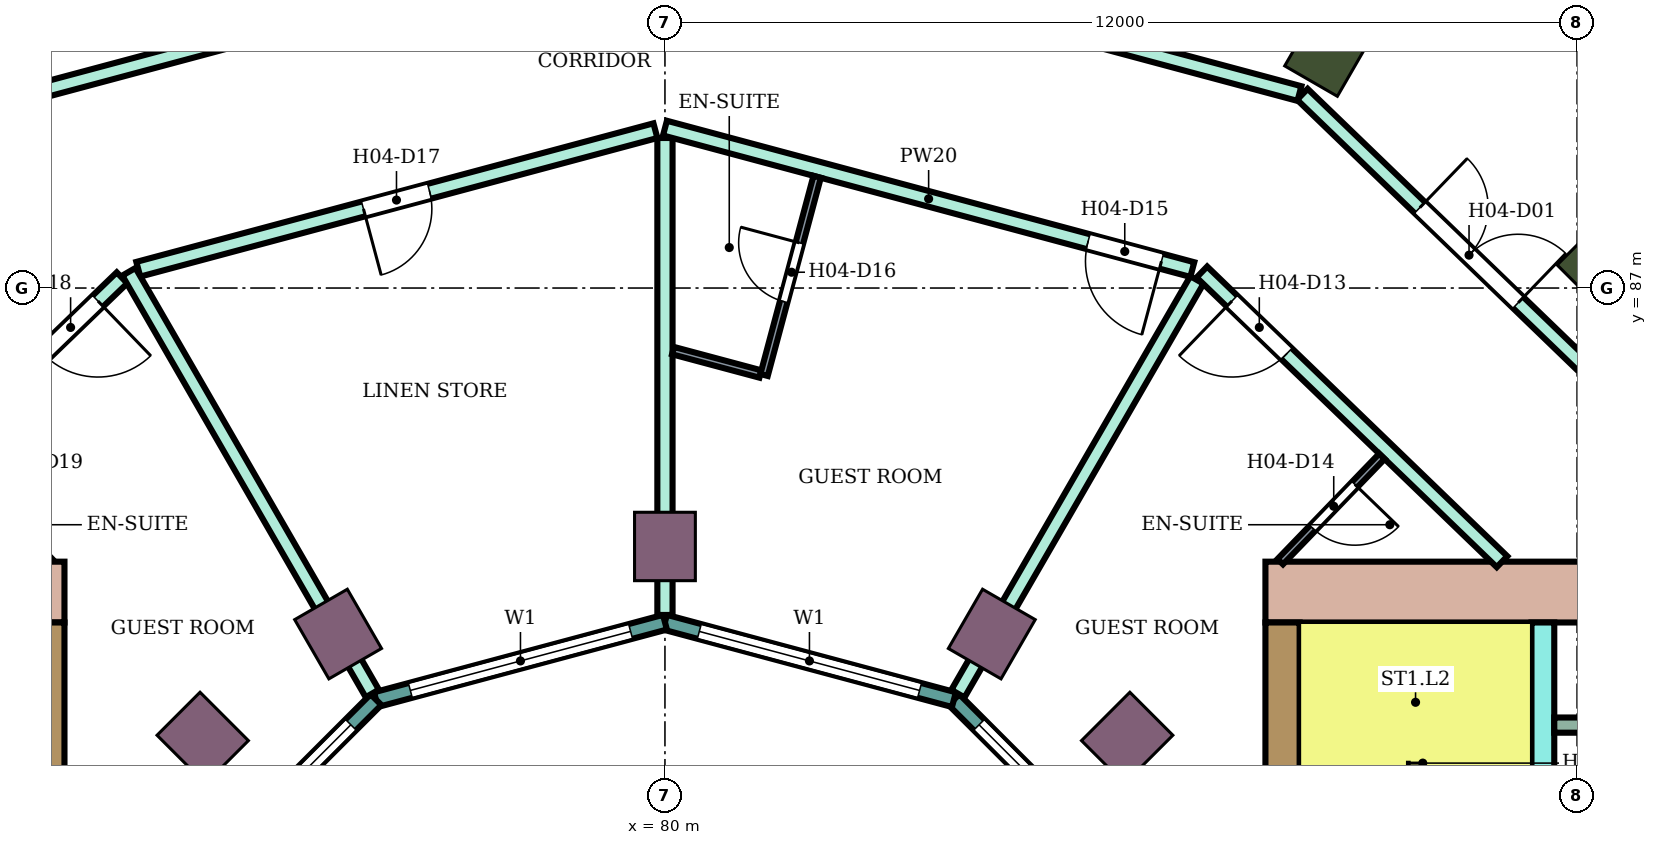
"""IFC4 building model, lengths in metres.
Left out: names, types, materials, properties, quantities, classifications, styles, units other than length and angle.
Written with IfcOpenShell. Run it as: python <this file> out.ifc"""

import sys

from ifc_helpers import new_model, si_unit, direction, frame, frame_2d, origin, origin_2d, place, context, subcontext, project, spatial, rectangle, extrude, element, fill, save


model = new_model("IFC4")
c1 = context("Model", 3, precision=1e-05, world=origin(), true_north=direction((0.0, 1.0)))
c2 = subcontext(c1, "Body", "Model", "MODEL_VIEW")
j1 = project(units=[si_unit("LENGTHUNIT", "METRE"), si_unit("PLANEANGLEUNIT", "RADIAN")], contexts=[c1])
p1 = place(None, origin())
s1 = spatial("IfcSite", under=j1, at=p1, CompositionType="ELEMENT")
p2 = place(p1, origin())
s2 = spatial("IfcBuilding", under=s1, at=p2, CompositionType="ELEMENT")
p3 = place(p2, frame((0.0, 0.0, 70.6)))
s3 = spatial("IfcBuildingStorey", under=s2, at=p3, CompositionType="ELEMENT", Elevation=70.6)
for number, where, z_axis, x_axis in (
    (1, (92.445, 87.445, 0.0), (0.0, 0.0, 1.0), (0.707, 0.707, 0.0)),
    (2, (88.8, 90.242, 0.0), (0.0, 0.0, 1.0), (0.5, 0.866, 0.0)),
):
    element("IfcColumn", number, at=place(p3, frame(where, z_axis=z_axis, x_axis=x_axis)), inside=s3, PredefinedType="COLUMN", context=c2, shape_type="SweptSolid", body=[
        extrude(rectangle(XDim=1.2, YDim=0.8, at=origin_2d()), origin(), (0.0, 0.0, 1.0), 3.8),
    ])
for number, where, z_axis, x_axis in (
    (3, (86.081, 81.081, 0.0), (0.0, 0.0, 1.0), (0.707, 0.707, 0.0)),
    (4, (84.3, 82.448, 0.0), (0.0, 0.0, 1.0), (0.5, 0.866, 0.0)),
    (5, (80.0, 83.6, 0.0), (0.0, 0.0, 1.0), (0.0, 1.0, 0.0)),
    (6, (75.7, 82.448, 0.0), (0.0, 0.0, 1.0), (-0.5, 0.866, 0.0)),
    (7, (73.919, 81.081, 0.0), (0.0, 0.0, 1.0), (-0.707, 0.707, 0.0)),
):
    element("IfcColumn", number, at=place(p3, frame(where, z_axis=z_axis, x_axis=x_axis)), inside=s3, PredefinedType="COLUMN", context=c2, shape_type="SweptSolid", body=[
        extrude(rectangle(XDim=0.9, YDim=0.8, at=origin_2d()), origin(), (0.0, 0.0, 1.0), 3.8),
    ])
p4 = place(p3, frame((87.9, 83.0, 0.0), z_axis=(0.0, 0.0, 1.0), x_axis=(1.0, 0.0, 0.0)))
e8 = element("IfcWall", 8, at=p4, inside=s3, PredefinedType="SHEAR", context=c2, shape_type="SweptSolid", body=[
    extrude(rectangle(XDim=14.7, YDim=0.8, at=frame_2d((7.35, 0.0))), origin(), (0.0, 0.0, 1.0), 3.4),
])
p5 = place(p4, frame((4.2, 0.0, 0.0)))
e9 = element("IfcOpeningElement", 9, at=p5, cuts=e8, PredefinedType="OPENING", context=c2, shape_type="SweptSolid", body=[
    extrude(rectangle(XDim=2.4, YDim=2.4, at=frame_2d((1.2, 1.2))), frame((0.0, 0.41, 0.0), z_axis=(0.0, -1.0, 0.0), x_axis=(1.0, 0.0, 0.0)), (0.0, 0.0, 1.0), 0.82),
])
p6 = place(p3, frame((88.125, 75.0, 0.0), z_axis=(0.0, 0.0, 1.0), x_axis=(0.0, 1.0, 0.0)))
e10 = element("IfcWall", 10, at=p6, inside=s3, PredefinedType="SHEAR", context=c2, shape_type="SweptSolid", body=[
    extrude(rectangle(XDim=7.6, YDim=0.45, at=frame_2d((3.8, 0.0))), origin(), (0.0, 0.0, 1.0), 3.4),
])
p7 = place(p3, frame((91.55, 75.0, 0.0), z_axis=(0.0, 0.0, 1.0), x_axis=(0.0, 1.0, 0.0)))
e11 = element("IfcWall", 11, at=p7, inside=s3, PredefinedType="SHEAR", context=c2, shape_type="SweptSolid", body=[
    extrude(rectangle(XDim=7.6, YDim=0.3, at=frame_2d((3.8, 0.0))), origin(), (0.0, 0.0, 1.0), 3.4),
])
p8 = place(p7, frame((1.85, 0.0, 0.0)))
e12 = element("IfcOpeningElement", 12, at=p8, cuts=e11, PredefinedType="OPENING", context=c2, shape_type="SweptSolid", body=[
    extrude(rectangle(XDim=0.9, YDim=2.1, at=frame_2d((0.45, 1.05))), frame((0.0, 0.16, 0.0), z_axis=(0.0, -1.0, 0.0), x_axis=(1.0, 0.0, 0.0)), (0.0, 0.0, 1.0), 0.32),
])
p9 = place(p3, frame((91.7, 81.25, 0.0), z_axis=(0.0, 0.0, 1.0), x_axis=(1.0, 0.0, 0.0)))
e13 = element("IfcWall", 13, at=p9, inside=s3, PredefinedType="SHEAR", context=c2, shape_type="SweptSolid", body=[
    extrude(rectangle(XDim=4.65, YDim=0.2, at=frame_2d((2.325, 0.0))), origin(), (0.0, 0.0, 1.0), 3.4),
])
p10 = place(p3, frame((72.1, 83.0, 0.0), z_axis=(0.0, 0.0, 1.0), x_axis=(-1.0, 0.0, 0.0)))
e14 = element("IfcWall", 14, at=p10, inside=s3, PredefinedType="SHEAR", context=c2, shape_type="SweptSolid", body=[
    extrude(rectangle(XDim=14.7, YDim=0.8, at=frame_2d((7.35, 0.0))), origin(), (0.0, 0.0, 1.0), 3.4),
])
p11 = place(p10, frame((4.2, 0.0, 0.0)))
e15 = element("IfcOpeningElement", 15, at=p11, cuts=e14, PredefinedType="OPENING", context=c2, shape_type="SweptSolid", body=[
    extrude(rectangle(XDim=2.4, YDim=2.4, at=frame_2d((1.2, 1.2))), frame((0.0, 0.41, 0.0), z_axis=(0.0, -1.0, 0.0), x_axis=(1.0, 0.0, 0.0)), (0.0, 0.0, 1.0), 0.82),
])
p12 = place(p3, frame((71.875, 82.6, 0.0), z_axis=(0.0, 0.0, 1.0), x_axis=(0.0, -1.0, 0.0)))
e16 = element("IfcWall", 16, at=p12, inside=s3, PredefinedType="SHEAR", context=c2, shape_type="SweptSolid", body=[
    extrude(rectangle(XDim=7.6, YDim=0.45, at=frame_2d((3.8, 0.0))), origin(), (0.0, 0.0, 1.0), 3.4),
])
p13 = place(p3, frame((86.585, 78.802, 0.0), z_axis=(0.0, 0.0, 1.0), x_axis=(-0.707106781187, 0.707106781187, 0.0)))
e17 = element("IfcWall", 17, at=p13, inside=s3, PredefinedType="NOTDEFINED", context=c2, shape_type="SweptSolid", body=[
    extrude(rectangle(XDim=3.936, YDim=0.2, at=frame_2d((1.968, 0.0))), origin(), (0.0, 0.0, 1.0), 3.8),
])
p14 = place(p13, frame((0.468, 0.0, 0.9)))
e18 = element("IfcOpeningElement", 18, at=p14, cuts=e17, PredefinedType="OPENING", context=c2, shape_type="SweptSolid", body=[
    extrude(rectangle(XDim=3.0, YDim=2.3, at=frame_2d((1.5, 1.15))), frame((0.0, 0.11, 0.0), z_axis=(0.0, -1.0, 0.0), x_axis=(1.0, 0.0, 0.0)), (0.0, 0.0, 1.0), 0.22),
])
p15 = place(p3, frame((83.802, 81.585, 0.0), z_axis=(0.0, 0.0, 1.0), x_axis=(-0.965933654434, 0.258789828301, 0.0)))
e19 = element("IfcWall", 19, at=p15, inside=s3, PredefinedType="NOTDEFINED", context=c2, shape_type="SweptSolid", body=[
    extrude(rectangle(XDim=3.936, YDim=0.2, at=frame_2d((1.968, 0.0))), origin(), (0.0, 0.0, 1.0), 3.8),
])
p16 = place(p15, frame((0.468, 0.0, 0.9)))
e20 = element("IfcOpeningElement", 20, at=p16, cuts=e19, PredefinedType="OPENING", context=c2, shape_type="SweptSolid", body=[
    extrude(rectangle(XDim=3.0, YDim=2.3, at=frame_2d((1.5, 1.15))), frame((0.0, 0.11, 0.0), z_axis=(0.0, -1.0, 0.0), x_axis=(1.0, 0.0, 0.0)), (0.0, 0.0, 1.0), 0.22),
])
p17 = place(p3, frame((80.0, 82.604, 0.0), z_axis=(0.0, 0.0, 1.0), x_axis=(-0.965933654434, -0.258789828301, 0.0)))
e21 = element("IfcWall", 21, at=p17, inside=s3, PredefinedType="NOTDEFINED", context=c2, shape_type="SweptSolid", body=[
    extrude(rectangle(XDim=3.936, YDim=0.2, at=frame_2d((1.968, 0.0))), origin(), (0.0, 0.0, 1.0), 3.8),
])
p18 = place(p17, frame((0.468, 0.0, 0.9)))
e22 = element("IfcOpeningElement", 22, at=p18, cuts=e21, PredefinedType="OPENING", context=c2, shape_type="SweptSolid", body=[
    extrude(rectangle(XDim=3.0, YDim=2.3, at=frame_2d((1.5, 1.15))), frame((0.0, 0.11, 0.0), z_axis=(0.0, -1.0, 0.0), x_axis=(1.0, 0.0, 0.0)), (0.0, 0.0, 1.0), 0.22),
])
p19 = place(p3, frame((76.198, 81.585, 0.0), z_axis=(0.0, 0.0, 1.0), x_axis=(-0.707106781187, -0.707106781187, 0.0)))
e23 = element("IfcWall", 23, at=p19, inside=s3, PredefinedType="NOTDEFINED", context=c2, shape_type="SweptSolid", body=[
    extrude(rectangle(XDim=3.936, YDim=0.2, at=frame_2d((1.968, 0.0))), origin(), (0.0, 0.0, 1.0), 3.8),
])
p20 = place(p19, frame((0.468, 0.0, 0.9)))
e24 = element("IfcOpeningElement", 24, at=p20, cuts=e23, PredefinedType="OPENING", context=c2, shape_type="SweptSolid", body=[
    extrude(rectangle(XDim=3.0, YDim=2.3, at=frame_2d((1.5, 1.15))), frame((0.0, 0.11, 0.0), z_axis=(0.0, -1.0, 0.0), x_axis=(1.0, 0.0, 0.0)), (0.0, 0.0, 1.0), 0.22),
])
p21 = place(p3, frame((68.987, 83.4, 0.0), z_axis=(0.0, 0.0, 1.0), x_axis=(0.719591503389, 0.694397629784, 0.0)))
e25 = element("IfcWall", 25, at=p21, inside=s3, PredefinedType="PARTITIONING", context=c2, shape_type="SweptSolid", body=[
    extrude(rectangle(XDim=5.378, YDim=0.2, at=frame_2d((2.689, 0.0))), origin(), (0.0, 0.0, 1.0), 3.35),
])
p22 = place(p21, frame((3.938, 0.0, 0.0)))
e26 = element("IfcOpeningElement", 26, at=p22, cuts=e25, PredefinedType="OPENING", context=c2, shape_type="SweptSolid", body=[
    extrude(rectangle(XDim=1.0, YDim=2.1, at=frame_2d((0.5, 1.05))), frame((0.0, 0.11, 0.0), z_axis=(0.0, -1.0, 0.0), x_axis=(1.0, 0.0, 0.0)), (0.0, 0.0, 1.0), 0.22),
])
p23 = place(p3, frame((71.614, 89.55, 0.0), z_axis=(0.0, 0.0, 1.0), x_axis=(0.965982156828, 0.258608725086, 0.0)))
e27 = element("IfcWall", 27, at=p23, inside=s3, PredefinedType="PARTITIONING", context=c2, shape_type="SweptSolid", body=[
    extrude(rectangle(XDim=8.592, YDim=0.2, at=frame_2d((4.296, 0.0))), origin(), (0.0, 0.0, 1.0), 3.35),
])
p24 = place(p23, frame((4.865, 0.0, 0.0)))
e28 = element("IfcOpeningElement", 28, at=p24, cuts=e27, PredefinedType="OPENING", context=c2, shape_type="SweptSolid", body=[
    extrude(rectangle(XDim=1.0, YDim=2.1, at=frame_2d((0.5, 1.05))), frame((0.0, 0.11, 0.0), z_axis=(0.0, -1.0, 0.0), x_axis=(1.0, 0.0, 0.0)), (0.0, 0.0, 1.0), 0.22),
])
p25 = place(p23, frame((2.804, 0.0, 0.0)))
e29 = element("IfcOpeningElement", 29, at=p25, cuts=e27, PredefinedType="OPENING", context=c2, shape_type="SweptSolid", body=[
    extrude(rectangle(XDim=1.0, YDim=2.1, at=frame_2d((0.5, 1.05))), frame((0.0, 0.11, 0.0), z_axis=(0.0, -1.0, 0.0), x_axis=(1.0, 0.0, 0.0)), (0.0, 0.0, 1.0), 0.22),
])
p26 = place(p3, frame((73.071, 87.247, 0.0), z_axis=(0.0, 0.0, 1.0), x_axis=(0.965914318977, 0.258861987157, 0.0)))
e30 = element("IfcWall", 30, at=p26, inside=s3, PredefinedType="PARTITIONING", context=c2, shape_type="SweptSolid", body=[
    extrude(rectangle(XDim=7.043, YDim=0.2, at=frame_2d((3.521, 0.0))), origin(), (0.0, 0.0, 1.0), 3.35),
])
p27 = place(p26, frame((3.067, 0.0, 0.0)))
e31 = element("IfcOpeningElement", 31, at=p27, cuts=e30, PredefinedType="OPENING", context=c2, shape_type="SweptSolid", body=[
    extrude(rectangle(XDim=0.9, YDim=2.1, at=frame_2d((0.45, 1.05))), frame((0.0, 0.11, 0.0), z_axis=(0.0, -1.0, 0.0), x_axis=(1.0, 0.0, 0.0)), (0.0, 0.0, 1.0), 0.22),
])
p28 = place(p3, frame((72.948, 87.214, 0.0), z_axis=(0.0, 0.0, 1.0), x_axis=(0.499927021214, -0.866067534006, 0.0)))
e32 = element("IfcWall", 32, at=p28, inside=s3, PredefinedType="PARTITIONING", context=c2, shape_type="SweptSolid", body=[
    extrude(rectangle(XDim=6.405, YDim=0.2, at=frame_2d((3.203, 0.0))), origin(), (0.0, 0.0, 1.0), 3.35),
])
p29 = place(p3, frame((80.0, 82.699, 0.0), z_axis=(0.0, 0.0, 1.0), x_axis=(0.0, 1.0, 0.0)))
e33 = element("IfcWall", 33, at=p29, inside=s3, PredefinedType="PARTITIONING", context=c2, shape_type="SweptSolid", body=[
    extrude(rectangle(XDim=6.275, YDim=0.2, at=frame_2d((3.138, 0.0))), origin(), (0.0, 0.0, 1.0), 3.35),
])
p30 = place(p3, frame((80.0, 89.104, 0.0), z_axis=(0.0, 0.0, 1.0), x_axis=(0.965854247166, -0.25908603442, 0.0)))
e34 = element("IfcWall", 34, at=p30, inside=s3, PredefinedType="PARTITIONING", context=c2, shape_type="SweptSolid", body=[
    extrude(rectangle(XDim=7.183, YDim=0.2, at=frame_2d((3.592, 0.0))), origin(), (0.0, 0.0, 1.0), 3.35),
])
p31 = place(p30, frame((5.763, 0.0, 0.0)))
e35 = element("IfcOpeningElement", 35, at=p31, cuts=e34, PredefinedType="OPENING", context=c2, shape_type="SweptSolid", body=[
    extrude(rectangle(XDim=1.0, YDim=2.1, at=frame_2d((0.5, 1.05))), frame((0.0, 0.11, 0.0), z_axis=(0.0, -1.0, 0.0), x_axis=(1.0, 0.0, 0.0)), (0.0, 0.0, 1.0), 0.22),
])
p32 = place(p3, frame((80.0, 91.796, 0.0), z_axis=(0.0, 0.0, 1.0), x_axis=(0.965891796243, -0.258946013582, 0.0)))
e36 = element("IfcWall", 36, at=p32, inside=s3, PredefinedType="PARTITIONING", context=c2, shape_type="SweptSolid", body=[
    extrude(rectangle(XDim=8.642, YDim=0.2, at=frame_2d((4.321, 0.0))), origin(), (0.0, 0.0, 1.0), 3.35),
])
p33 = place(p32, frame((2.817, 0.0, 0.0)))
e37 = element("IfcOpeningElement", 37, at=p33, cuts=e36, PredefinedType="OPENING", context=c2, shape_type="SweptSolid", body=[
    extrude(rectangle(XDim=1.0, YDim=2.1, at=frame_2d((0.5, 1.05))), frame((0.0, 0.11, 0.0), z_axis=(0.0, -1.0, 0.0), x_axis=(1.0, 0.0, 0.0)), (0.0, 0.0, 1.0), 0.22),
])
p34 = place(p3, frame((83.854, 81.664, 0.0), z_axis=(0.0, 0.0, 1.0), x_axis=(0.500224530691, 0.865895732115, 0.0)))
e38 = element("IfcWall", 38, at=p34, inside=s3, PredefinedType="PARTITIONING", context=c2, shape_type="SweptSolid", body=[
    extrude(rectangle(XDim=6.285, YDim=0.2, at=frame_2d((3.143, 0.0))), origin(), (0.0, 0.0, 1.0), 3.35),
])
p35 = place(p3, frame((87.064, 87.211, 0.0), z_axis=(0.0, 0.0, 1.0), x_axis=(0.719540958932, -0.694450004262, 0.0)))
e39 = element("IfcWall", 39, at=p35, inside=s3, PredefinedType="PARTITIONING", context=c2, shape_type="SweptSolid", body=[
    extrude(rectangle(XDim=5.488, YDim=0.2, at=frame_2d((2.744, 0.0))), origin(), (0.0, 0.0, 1.0), 3.35),
])
p36 = place(p35, frame((0.55, 0.0, 0.0)))
e40 = element("IfcOpeningElement", 40, at=p36, cuts=e39, PredefinedType="OPENING", context=c2, shape_type="SweptSolid", body=[
    extrude(rectangle(XDim=1.0, YDim=2.1, at=frame_2d((0.5, 1.05))), frame((0.0, 0.11, 0.0), z_axis=(0.0, -1.0, 0.0), x_axis=(1.0, 0.0, 0.0)), (0.0, 0.0, 1.0), 0.22),
])
p37 = place(p3, frame((88.386, 89.549, 0.0), z_axis=(0.0, 0.0, 1.0), x_axis=(0.719560576741, -0.694429677073, 0.0)))
e41 = element("IfcWall", 41, at=p37, inside=s3, PredefinedType="PARTITIONING", context=c2, shape_type="SweptSolid", body=[
    extrude(rectangle(XDim=6.635, YDim=0.2, at=frame_2d((3.318, 0.0))), origin(), (0.0, 0.0, 1.0), 3.35),
])
p38 = place(p37, frame((2.147, 0.0, 0.0)))
e42 = element("IfcOpeningElement", 42, at=p38, cuts=e41, PredefinedType="OPENING", context=c2, shape_type="SweptSolid", body=[
    extrude(rectangle(XDim=1.8, YDim=2.1, at=frame_2d((0.9, 1.05))), frame((0.0, 0.11, 0.0), z_axis=(0.0, -1.0, 0.0), x_axis=(1.0, 0.0, 0.0)), (0.0, 0.0, 1.0), 0.22),
])
p39 = place(p3, frame((80.106, 86.177, 0.0), z_axis=(0.0, 0.0, 1.0), x_axis=(0.966002973184, -0.258530957139, 0.0)))
e43 = element("IfcWall", 43, at=p39, inside=s3, PredefinedType="PARTITIONING", context=c2, shape_type="SweptSolid", body=[
    extrude(rectangle(XDim=1.19, YDim=0.1, at=frame_2d((0.595, 0.0))), origin(), (0.0, 0.0, 1.0), 3.35),
])
p40 = place(p3, frame((81.304, 85.856, 0.0), z_axis=(0.0, 0.0, 1.0), x_axis=(0.25867580527, 0.965964195904, 0.0)))
e44 = element("IfcWall", 44, at=p40, inside=s3, PredefinedType="PARTITIONING", context=c2, shape_type="SweptSolid", body=[
    extrude(rectangle(XDim=2.699, YDim=0.1, at=frame_2d((1.35, 0.0))), origin(), (0.0, 0.0, 1.0), 3.35),
])
p41 = place(p40, frame((1.0, 0.0, 0.0)))
e45 = element("IfcOpeningElement", 45, at=p41, cuts=e44, PredefinedType="OPENING", context=c2, shape_type="SweptSolid", body=[
    extrude(rectangle(XDim=0.8, YDim=2.1, at=frame_2d((0.4, 1.05))), frame((0.0, 0.06, 0.0), z_axis=(0.0, -1.0, 0.0), x_axis=(1.0, 0.0, 0.0)), (0.0, 0.0, 1.0), 0.12),
])
p42 = place(p3, frame((88.095, 83.4, 0.0), z_axis=(0.0, 0.0, 1.0), x_axis=(0.694447472534, 0.719543402368, 0.0)))
e46 = element("IfcWall", 46, at=p42, inside=s3, PredefinedType="PARTITIONING", context=c2, shape_type="SweptSolid", body=[
    extrude(rectangle(XDim=1.926, YDim=0.1, at=frame_2d((0.963, 0.0))), origin(), (0.0, 0.0, 1.0), 3.35),
])
p43 = place(p42, frame((0.613, 0.0, 0.0)))
e47 = element("IfcOpeningElement", 47, at=p43, cuts=e46, PredefinedType="OPENING", context=c2, shape_type="SweptSolid", body=[
    extrude(rectangle(XDim=0.8, YDim=2.1, at=frame_2d((0.4, 1.05))), frame((0.0, 0.06, 0.0), z_axis=(0.0, -1.0, 0.0), x_axis=(1.0, 0.0, 0.0)), (0.0, 0.0, 1.0), 0.12),
])
p44 = place(p14, origin())
e48 = element("IfcWindow", 48, at=p44, inside=s3, PartitioningType="SINGLE_PANEL", PredefinedType="WINDOW", context=c2, shape_type="SweptSolid", body=[
    extrude(rectangle(XDim=3.0, YDim=2.3, at=frame_2d((1.5, 1.15))), frame((0.0, 0.03, 0.0), z_axis=(0.0, -1.0, 0.0), x_axis=(1.0, 0.0, 0.0)), (0.0, 0.0, 1.0), 0.06),
])
fill(e18, e48)
p45 = place(p16, origin())
e49 = element("IfcWindow", 49, at=p45, inside=s3, PartitioningType="SINGLE_PANEL", PredefinedType="WINDOW", context=c2, shape_type="SweptSolid", body=[
    extrude(rectangle(XDim=3.0, YDim=2.3, at=frame_2d((1.5, 1.15))), frame((0.0, 0.03, 0.0), z_axis=(0.0, -1.0, 0.0), x_axis=(1.0, 0.0, 0.0)), (0.0, 0.0, 1.0), 0.06),
])
fill(e20, e49)
p46 = place(p18, origin())
e50 = element("IfcWindow", 50, at=p46, inside=s3, PartitioningType="SINGLE_PANEL", PredefinedType="WINDOW", context=c2, shape_type="SweptSolid", body=[
    extrude(rectangle(XDim=3.0, YDim=2.3, at=frame_2d((1.5, 1.15))), frame((0.0, 0.03, 0.0), z_axis=(0.0, -1.0, 0.0), x_axis=(1.0, 0.0, 0.0)), (0.0, 0.0, 1.0), 0.06),
])
fill(e22, e50)
p47 = place(p20, origin())
e51 = element("IfcWindow", 51, at=p47, inside=s3, PartitioningType="SINGLE_PANEL", PredefinedType="WINDOW", context=c2, shape_type="SweptSolid", body=[
    extrude(rectangle(XDim=3.0, YDim=2.3, at=frame_2d((1.5, 1.15))), frame((0.0, 0.03, 0.0), z_axis=(0.0, -1.0, 0.0), x_axis=(1.0, 0.0, 0.0)), (0.0, 0.0, 1.0), 0.06),
])
fill(e24, e51)
p48 = place(p38, origin())
e52 = element("IfcDoor", 52, at=p48, inside=s3, OperationType="DOUBLE_DOOR_SINGLE_SWING", PredefinedType="DOOR", context=c2, shape_type="SweptSolid", body=[
    extrude(rectangle(XDim=1.8, YDim=2.1, at=frame_2d((0.9, 1.05))), frame((0.0, 0.025, 0.0), z_axis=(0.0, -1.0, 0.0), x_axis=(1.0, 0.0, 0.0)), (0.0, 0.0, 1.0), 0.05),
])
fill(e42, e52)
p49 = place(p36, frame((1.0, 0.0, 0.0), z_axis=(0.0, 0.0, 1.0), x_axis=(-1.0, 0.0, 0.0)))
e53 = element("IfcDoor", 53, at=p49, inside=s3, OperationType="SINGLE_SWING_RIGHT", PredefinedType="DOOR", context=c2, shape_type="SweptSolid", body=[
    extrude(rectangle(XDim=1.0, YDim=2.1, at=frame_2d((0.5, 1.05))), frame((0.0, 0.025, 0.0), z_axis=(0.0, -1.0, 0.0), x_axis=(1.0, 0.0, 0.0)), (0.0, 0.0, 1.0), 0.05),
])
fill(e40, e53)
p50 = place(p43, frame((0.8, 0.0, 0.0), z_axis=(0.0, 0.0, 1.0), x_axis=(-1.0, 0.0, 0.0)))
e54 = element("IfcDoor", 54, at=p50, inside=s3, OperationType="SINGLE_SWING_LEFT", PredefinedType="DOOR", context=c2, shape_type="SweptSolid", body=[
    extrude(rectangle(XDim=0.8, YDim=2.1, at=frame_2d((0.4, 1.05))), frame((0.0, 0.025, 0.0), z_axis=(0.0, -1.0, 0.0), x_axis=(1.0, 0.0, 0.0)), (0.0, 0.0, 1.0), 0.05),
])
fill(e47, e54)
p51 = place(p31, frame((1.0, 0.0, 0.0), z_axis=(0.0, 0.0, 1.0), x_axis=(-1.0, 0.0, 0.0)))
e55 = element("IfcDoor", 55, at=p51, inside=s3, OperationType="SINGLE_SWING_LEFT", PredefinedType="DOOR", context=c2, shape_type="SweptSolid", body=[
    extrude(rectangle(XDim=1.0, YDim=2.1, at=frame_2d((0.5, 1.05))), frame((0.0, 0.025, 0.0), z_axis=(0.0, -1.0, 0.0), x_axis=(1.0, 0.0, 0.0)), (0.0, 0.0, 1.0), 0.05),
])
fill(e35, e55)
p52 = place(p41, origin())
e56 = element("IfcDoor", 56, at=p52, inside=s3, OperationType="SINGLE_SWING_RIGHT", PredefinedType="DOOR", context=c2, shape_type="SweptSolid", body=[
    extrude(rectangle(XDim=0.8, YDim=2.1, at=frame_2d((0.4, 1.05))), frame((0.0, 0.025, 0.0), z_axis=(0.0, -1.0, 0.0), x_axis=(1.0, 0.0, 0.0)), (0.0, 0.0, 1.0), 0.05),
])
fill(e45, e56)
p53 = place(p27, frame((0.9, 0.0, 0.0), z_axis=(0.0, 0.0, 1.0), x_axis=(-1.0, 0.0, 0.0)))
e57 = element("IfcDoor", 57, at=p53, inside=s3, OperationType="SINGLE_SWING_RIGHT", PredefinedType="DOOR", context=c2, shape_type="SweptSolid", body=[
    extrude(rectangle(XDim=0.9, YDim=2.1, at=frame_2d((0.45, 1.05))), frame((0.0, 0.025, 0.0), z_axis=(0.0, -1.0, 0.0), x_axis=(1.0, 0.0, 0.0)), (0.0, 0.0, 1.0), 0.05),
])
fill(e31, e57)
p54 = place(p22, frame((1.0, 0.0, 0.0), z_axis=(0.0, 0.0, 1.0), x_axis=(-1.0, 0.0, 0.0)))
e58 = element("IfcDoor", 58, at=p54, inside=s3, OperationType="SINGLE_SWING_LEFT", PredefinedType="DOOR", context=c2, shape_type="SweptSolid", body=[
    extrude(rectangle(XDim=1.0, YDim=2.1, at=frame_2d((0.5, 1.05))), frame((0.0, 0.025, 0.0), z_axis=(0.0, -1.0, 0.0), x_axis=(1.0, 0.0, 0.0)), (0.0, 0.0, 1.0), 0.05),
])
fill(e26, e58)
save(model, sys.argv[1])
